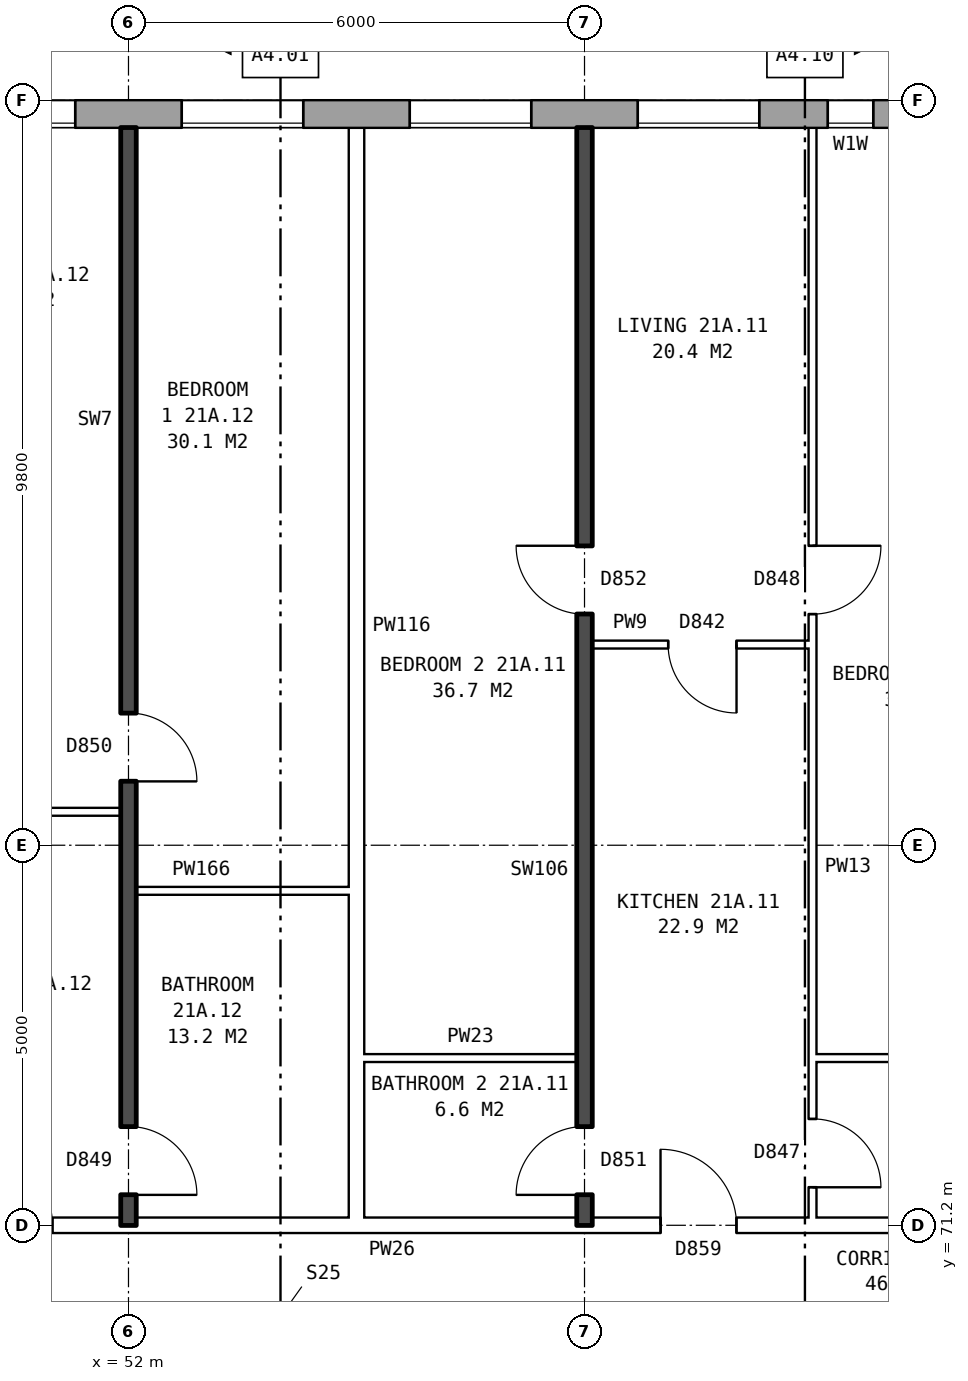
"""IFC4 building model, lengths in metres.
Left out: names, types, materials, properties, quantities, classifications, styles, units other than length and angle.
Written with IfcOpenShell. Run it as: python <this file> out.ifc"""

import sys

from ifc_helpers import new_model, si_unit, direction, frame, frame_2d, origin, place, context, subcontext, project, spatial, rectangle, extrude, element, fill, save


model = new_model("IFC4")
c1 = context("Model", 3, precision=1e-05, world=origin(), true_north=direction((0.0, 1.0)))
c2 = subcontext(c1, "Body", "Model", "MODEL_VIEW")
j1 = project(units=[si_unit("LENGTHUNIT", "METRE"), si_unit("PLANEANGLEUNIT", "RADIAN")], contexts=[c1])
p1 = place(None, origin())
s1 = spatial("IfcSite", under=j1, at=p1, CompositionType="ELEMENT")
p2 = place(p1, origin())
s2 = spatial("IfcBuilding", under=s1, at=p2, CompositionType="ELEMENT")
p3 = place(p2, frame((0.0, 0.0, 77.8)))
s3 = spatial("IfcBuildingStorey", under=s2, at=p3, CompositionType="ELEMENT", Elevation=77.8)
p4 = place(p3, frame((72.925, 85.82, 0.0), z_axis=(0.0, 0.0, 1.0), x_axis=(-1.0, 0.0, 0.0)))
e1 = element("IfcWall", 1, at=p4, inside=s3, PredefinedType="STANDARD", context=c2, shape_type="SweptSolid", body=[
    extrude(rectangle(XDim=46.601, YDim=0.36, at=frame_2d((23.3, 0.0))), origin(), (0.0, 0.0, 1.0), 2.85),
])
p5 = place(p4, frame((0.625, 0.0, 0.8)))
e2 = element("IfcOpeningElement", 2, at=p5, cuts=e1, PredefinedType="OPENING", context=c2, shape_type="SweptSolid", body=[
    extrude(rectangle(XDim=1.6, YDim=1.8, at=frame_2d((0.8, 0.9))), frame((0.0, 0.19, 0.0), z_axis=(0.0, -1.0, 0.0), x_axis=(1.0, 0.0, 0.0)), (0.0, 0.0, 1.0), 0.38),
])
p6 = place(p4, frame((3.625, 0.0, 0.8)))
e3 = element("IfcOpeningElement", 3, at=p6, cuts=e1, PredefinedType="OPENING", context=c2, shape_type="SweptSolid", body=[
    extrude(rectangle(XDim=1.6, YDim=1.8, at=frame_2d((0.8, 0.9))), frame((0.0, 0.19, 0.0), z_axis=(0.0, -1.0, 0.0), x_axis=(1.0, 0.0, 0.0)), (0.0, 0.0, 1.0), 0.38),
])
p7 = place(p4, frame((6.625, 0.0, 0.8)))
e4 = element("IfcOpeningElement", 4, at=p7, cuts=e1, PredefinedType="OPENING", context=c2, shape_type="SweptSolid", body=[
    extrude(rectangle(XDim=1.6, YDim=1.8, at=frame_2d((0.8, 0.9))), frame((0.0, 0.19, 0.0), z_axis=(0.0, -1.0, 0.0), x_axis=(1.0, 0.0, 0.0)), (0.0, 0.0, 1.0), 0.38),
])
p8 = place(p4, frame((9.125, 0.0, 1.65)))
e5 = element("IfcOpeningElement", 5, at=p8, cuts=e1, PredefinedType="OPENING", context=c2, shape_type="SweptSolid", body=[
    extrude(rectangle(XDim=1.4, YDim=0.9, at=frame_2d((0.7, 0.45))), frame((0.0, 0.19, 0.0), z_axis=(0.0, -1.0, 0.0), x_axis=(1.0, 0.0, 0.0)), (0.0, 0.0, 1.0), 0.38),
])
p9 = place(p4, frame((12.625, 0.0, 0.8)))
e6 = element("IfcOpeningElement", 6, at=p9, cuts=e1, PredefinedType="OPENING", context=c2, shape_type="SweptSolid", body=[
    extrude(rectangle(XDim=1.6, YDim=1.8, at=frame_2d((0.8, 0.9))), frame((0.0, 0.19, 0.0), z_axis=(0.0, -1.0, 0.0), x_axis=(1.0, 0.0, 0.0)), (0.0, 0.0, 1.0), 0.38),
])
p10 = place(p4, frame((15.625, 0.0, 0.8)))
e7 = element("IfcOpeningElement", 7, at=p10, cuts=e1, PredefinedType="OPENING", context=c2, shape_type="SweptSolid", body=[
    extrude(rectangle(XDim=1.6, YDim=1.8, at=frame_2d((0.8, 0.9))), frame((0.0, 0.19, 0.0), z_axis=(0.0, -1.0, 0.0), x_axis=(1.0, 0.0, 0.0)), (0.0, 0.0, 1.0), 0.38),
])
p11 = place(p4, frame((18.625, 0.0, 0.8)))
e8 = element("IfcOpeningElement", 8, at=p11, cuts=e1, PredefinedType="OPENING", context=c2, shape_type="SweptSolid", body=[
    extrude(rectangle(XDim=1.6, YDim=1.8, at=frame_2d((0.8, 0.9))), frame((0.0, 0.19, 0.0), z_axis=(0.0, -1.0, 0.0), x_axis=(1.0, 0.0, 0.0)), (0.0, 0.0, 1.0), 0.38),
])
p12 = place(p4, frame((21.625, 0.0, 0.8)))
e9 = element("IfcOpeningElement", 9, at=p12, cuts=e1, PredefinedType="OPENING", context=c2, shape_type="SweptSolid", body=[
    extrude(rectangle(XDim=1.6, YDim=1.8, at=frame_2d((0.8, 0.9))), frame((0.0, 0.19, 0.0), z_axis=(0.0, -1.0, 0.0), x_axis=(1.0, 0.0, 0.0)), (0.0, 0.0, 1.0), 0.38),
])
p13 = place(p4, frame((24.625, 0.0, 0.8)))
e10 = element("IfcOpeningElement", 10, at=p13, cuts=e1, PredefinedType="OPENING", context=c2, shape_type="SweptSolid", body=[
    extrude(rectangle(XDim=1.6, YDim=1.8, at=frame_2d((0.8, 0.9))), frame((0.0, 0.19, 0.0), z_axis=(0.0, -1.0, 0.0), x_axis=(1.0, 0.0, 0.0)), (0.0, 0.0, 1.0), 0.38),
])
p14 = place(p4, frame((27.625, 0.0, 0.8)))
e11 = element("IfcOpeningElement", 11, at=p14, cuts=e1, PredefinedType="OPENING", context=c2, shape_type="SweptSolid", body=[
    extrude(rectangle(XDim=1.6, YDim=1.8, at=frame_2d((0.8, 0.9))), frame((0.0, 0.19, 0.0), z_axis=(0.0, -1.0, 0.0), x_axis=(1.0, 0.0, 0.0)), (0.0, 0.0, 1.0), 0.38),
])
p15 = place(p4, frame((30.625, 0.0, 0.8)))
e12 = element("IfcOpeningElement", 12, at=p15, cuts=e1, PredefinedType="OPENING", context=c2, shape_type="SweptSolid", body=[
    extrude(rectangle(XDim=1.6, YDim=1.8, at=frame_2d((0.8, 0.9))), frame((0.0, 0.19, 0.0), z_axis=(0.0, -1.0, 0.0), x_axis=(1.0, 0.0, 0.0)), (0.0, 0.0, 1.0), 0.38),
])
p16 = place(p4, frame((33.125, 0.0, 0.75)))
e13 = element("IfcOpeningElement", 13, at=p16, cuts=e1, PredefinedType="OPENING", context=c2, shape_type="SweptSolid", body=[
    extrude(rectangle(XDim=0.6, YDim=1.8, at=frame_2d((0.3, 0.9))), frame((0.0, 0.19, 0.0), z_axis=(0.0, -1.0, 0.0), x_axis=(1.0, 0.0, 0.0)), (0.0, 0.0, 1.0), 0.38),
])
p17 = place(p4, frame((36.125, 0.0, 1.6)))
e14 = element("IfcOpeningElement", 14, at=p17, cuts=e1, PredefinedType="OPENING", context=c2, shape_type="SweptSolid", body=[
    extrude(rectangle(XDim=0.6, YDim=0.9, at=frame_2d((0.3, 0.45))), frame((0.0, 0.19, 0.0), z_axis=(0.0, -1.0, 0.0), x_axis=(1.0, 0.0, 0.0)), (0.0, 0.0, 1.0), 0.38),
])
p18 = place(p4, frame((39.625, 0.0, 0.8)))
e15 = element("IfcOpeningElement", 15, at=p18, cuts=e1, PredefinedType="OPENING", context=c2, shape_type="SweptSolid", body=[
    extrude(rectangle(XDim=1.6, YDim=1.8, at=frame_2d((0.8, 0.9))), frame((0.0, 0.19, 0.0), z_axis=(0.0, -1.0, 0.0), x_axis=(1.0, 0.0, 0.0)), (0.0, 0.0, 1.0), 0.38),
])
p19 = place(p4, frame((42.625, 0.0, 0.8)))
e16 = element("IfcOpeningElement", 16, at=p19, cuts=e1, PredefinedType="OPENING", context=c2, shape_type="SweptSolid", body=[
    extrude(rectangle(XDim=1.6, YDim=1.8, at=frame_2d((0.8, 0.9))), frame((0.0, 0.19, 0.0), z_axis=(0.0, -1.0, 0.0), x_axis=(1.0, 0.0, 0.0)), (0.0, 0.0, 1.0), 0.38),
])
p20 = place(p4, frame((11.125, 0.0, 0.15)))
e17 = element("IfcOpeningElement", 17, at=p20, cuts=e1, PredefinedType="OPENING", context=c2, shape_type="SweptSolid", body=[
    extrude(rectangle(XDim=0.6, YDim=0.9, at=frame_2d((0.3, 0.45))), frame((0.0, 0.19, 0.0), z_axis=(0.0, -1.0, 0.0), x_axis=(1.0, 0.0, 0.0)), (0.0, 0.0, 1.0), 0.38),
])
p21 = place(p4, frame((34.025, 0.0, 0.65)))
e18 = element("IfcOpeningElement", 18, at=p21, cuts=e1, PredefinedType="OPENING", context=c2, shape_type="SweptSolid", body=[
    extrude(rectangle(XDim=0.8, YDim=0.9, at=frame_2d((0.4, 0.45))), frame((0.0, 0.19, 0.0), z_axis=(0.0, -1.0, 0.0), x_axis=(1.0, 0.0, 0.0)), (0.0, 0.0, 1.0), 0.38),
])
p22 = place(p4, frame((37.025, 0.0, 0.8)))
e19 = element("IfcOpeningElement", 19, at=p22, cuts=e1, PredefinedType="OPENING", context=c2, shape_type="SweptSolid", body=[
    extrude(rectangle(XDim=1.6, YDim=1.8, at=frame_2d((0.8, 0.9))), frame((0.0, 0.19, 0.0), z_axis=(0.0, -1.0, 0.0), x_axis=(1.0, 0.0, 0.0)), (0.0, 0.0, 1.0), 0.38),
])
p23 = place(p3, frame((44.36, 71.2, 0.0), z_axis=(0.0, 0.0, 1.0), x_axis=(1.0, 0.0, 0.0)))
e20 = element("IfcWall", 20, at=p23, inside=s3, PredefinedType="PARTITIONING", context=c2, shape_type="SweptSolid", body=[
    extrude(rectangle(XDim=19.28, YDim=0.2, at=frame_2d((9.64, 0.0))), origin(), (0.0, 0.0, 1.0), 2.85),
])
p24 = place(p23, frame((14.64, 0.0, 0.0)))
e21 = element("IfcOpeningElement", 21, at=p24, cuts=e20, PredefinedType="OPENING", context=c2, shape_type="SweptSolid", body=[
    extrude(rectangle(XDim=1.0, YDim=2.1, at=frame_2d((0.5, 1.05))), frame((0.0, 0.11, 0.0), z_axis=(0.0, -1.0, 0.0), x_axis=(1.0, 0.0, 0.0)), (0.0, 0.0, 1.0), 0.22),
])
p25 = place(p23, frame((5.64, 0.0, 0.0)))
e22 = element("IfcOpeningElement", 22, at=p25, cuts=e20, PredefinedType="OPENING", context=c2, shape_type="SweptSolid", body=[
    extrude(rectangle(XDim=1.0, YDim=2.1, at=frame_2d((0.5, 1.05))), frame((0.0, 0.11, 0.0), z_axis=(0.0, -1.0, 0.0), x_axis=(1.0, 0.0, 0.0)), (0.0, 0.0, 1.0), 0.22),
])
p26 = place(p3, frame((55.1, 73.4, 0.0), z_axis=(0.0, 0.0, 1.0), x_axis=(1.0, 0.0, 0.0)))
e23 = element("IfcWall", 23, at=p26, inside=s3, PredefinedType="PARTITIONING", context=c2, shape_type="SweptSolid", body=[
    extrude(rectangle(XDim=2.8, YDim=0.1, at=frame_2d((1.4, 0.0))), origin(), (0.0, 0.0, 1.0), 2.85),
])
p27 = place(p3, frame((61.0, 73.4, 0.0), z_axis=(0.0, 0.0, 1.0), x_axis=(1.0, 0.0, 0.0)))
e24 = element("IfcWall", 24, at=p27, inside=s3, PredefinedType="PARTITIONING", context=c2, shape_type="SweptSolid", body=[
    extrude(rectangle(XDim=2.64, YDim=0.1, at=frame_2d((1.32, 0.0))), origin(), (0.0, 0.0, 1.0), 2.85),
])
p28 = place(p3, frame((52.1, 75.6, 0.0), z_axis=(0.0, 0.0, 1.0), x_axis=(1.0, 0.0, 0.0)))
e25 = element("IfcWall", 25, at=p28, inside=s3, PredefinedType="PARTITIONING", context=c2, shape_type="SweptSolid", body=[
    extrude(rectangle(XDim=2.8, YDim=0.1, at=frame_2d((1.4, 0.0))), origin(), (0.0, 0.0, 1.0), 2.85),
])
p29 = place(p3, frame((49.0, 76.64, 0.0), z_axis=(0.0, 0.0, 1.0), x_axis=(1.0, 0.0, 0.0)))
e26 = element("IfcWall", 26, at=p29, inside=s3, PredefinedType="PARTITIONING", context=c2, shape_type="SweptSolid", body=[
    extrude(rectangle(XDim=2.9, YDim=0.1, at=frame_2d((1.45, 0.0))), origin(), (0.0, 0.0, 1.0), 2.85),
])
p30 = place(p29, frame((1.0, 0.0, 0.0)))
e27 = element("IfcOpeningElement", 27, at=p30, cuts=e26, PredefinedType="OPENING", context=c2, shape_type="SweptSolid", body=[
    extrude(rectangle(XDim=0.9, YDim=2.1, at=frame_2d((0.45, 1.05))), frame((0.0, 0.06, 0.0), z_axis=(0.0, -1.0, 0.0), x_axis=(1.0, 0.0, 0.0)), (0.0, 0.0, 1.0), 0.12),
])
p31 = place(p3, frame((58.1, 78.84, 0.0), z_axis=(0.0, 0.0, 1.0), x_axis=(1.0, 0.0, 0.0)))
e28 = element("IfcWall", 28, at=p31, inside=s3, PredefinedType="PARTITIONING", context=c2, shape_type="SweptSolid", body=[
    extrude(rectangle(XDim=2.9, YDim=0.1, at=frame_2d((1.45, 0.0))), origin(), (0.0, 0.0, 1.0), 2.85),
])
p32 = place(p31, frame((1.0, 0.0, 0.0)))
e29 = element("IfcOpeningElement", 29, at=p32, cuts=e28, PredefinedType="OPENING", context=c2, shape_type="SweptSolid", body=[
    extrude(rectangle(XDim=0.9, YDim=2.1, at=frame_2d((0.45, 1.05))), frame((0.0, 0.06, 0.0), z_axis=(0.0, -1.0, 0.0), x_axis=(1.0, 0.0, 0.0)), (0.0, 0.0, 1.0), 0.12),
])
p33 = place(p3, frame((52.0, 71.2, 0.0), z_axis=(0.0, 0.0, 1.0), x_axis=(0.0, 1.0, 0.0)))
e30 = element("IfcWall", 30, at=p33, inside=s3, PredefinedType="SOLIDWALL", context=c2, shape_type="SweptSolid", body=[
    extrude(rectangle(XDim=14.44, YDim=0.2, at=frame_2d((7.22, 0.0))), origin(), (0.0, 0.0, 1.0), 2.85),
])
p34 = place(p33, frame((5.84, 0.0, 0.0)))
e31 = element("IfcOpeningElement", 31, at=p34, cuts=e30, PredefinedType="OPENING", context=c2, shape_type="SweptSolid", body=[
    extrude(rectangle(XDim=0.9, YDim=2.1, at=frame_2d((0.45, 1.05))), frame((0.0, 0.11, 0.0), z_axis=(0.0, -1.0, 0.0), x_axis=(1.0, 0.0, 0.0)), (0.0, 0.0, 1.0), 0.22),
])
p35 = place(p33, frame((0.4, 0.0, 0.0)))
e32 = element("IfcOpeningElement", 32, at=p35, cuts=e30, PredefinedType="OPENING", context=c2, shape_type="SweptSolid", body=[
    extrude(rectangle(XDim=0.9, YDim=2.1, at=frame_2d((0.45, 1.05))), frame((0.0, 0.11, 0.0), z_axis=(0.0, -1.0, 0.0), x_axis=(1.0, 0.0, 0.0)), (0.0, 0.0, 1.0), 0.22),
])
p36 = place(p3, frame((55.0, 71.3, 0.0), z_axis=(0.0, 0.0, 1.0), x_axis=(0.0, 1.0, 0.0)))
e33 = element("IfcWall", 33, at=p36, inside=s3, PredefinedType="PARTITIONING", context=c2, shape_type="SweptSolid", body=[
    extrude(rectangle(XDim=14.34, YDim=0.2, at=frame_2d((7.17, 0.0))), origin(), (0.0, 0.0, 1.0), 2.85),
])
p37 = place(p3, frame((58.0, 71.2, 0.0), z_axis=(0.0, 0.0, 1.0), x_axis=(0.0, 1.0, 0.0)))
e34 = element("IfcWall", 34, at=p37, inside=s3, PredefinedType="SOLIDWALL", context=c2, shape_type="SweptSolid", body=[
    extrude(rectangle(XDim=14.44, YDim=0.2, at=frame_2d((7.22, 0.0))), origin(), (0.0, 0.0, 1.0), 2.85),
])
p38 = place(p37, frame((8.04, 0.0, 0.0)))
e35 = element("IfcOpeningElement", 35, at=p38, cuts=e34, PredefinedType="OPENING", context=c2, shape_type="SweptSolid", body=[
    extrude(rectangle(XDim=0.9, YDim=2.1, at=frame_2d((0.45, 1.05))), frame((0.0, 0.11, 0.0), z_axis=(0.0, -1.0, 0.0), x_axis=(1.0, 0.0, 0.0)), (0.0, 0.0, 1.0), 0.22),
])
p39 = place(p37, frame((0.4, 0.0, 0.0)))
e36 = element("IfcOpeningElement", 36, at=p39, cuts=e34, PredefinedType="OPENING", context=c2, shape_type="SweptSolid", body=[
    extrude(rectangle(XDim=0.9, YDim=2.1, at=frame_2d((0.45, 1.05))), frame((0.0, 0.11, 0.0), z_axis=(0.0, -1.0, 0.0), x_axis=(1.0, 0.0, 0.0)), (0.0, 0.0, 1.0), 0.22),
])
p40 = place(p3, frame((61.0, 71.3, 0.0), z_axis=(0.0, 0.0, 1.0), x_axis=(0.0, 1.0, 0.0)))
e37 = element("IfcWall", 37, at=p40, inside=s3, PredefinedType="PARTITIONING", context=c2, shape_type="SweptSolid", body=[
    extrude(rectangle(XDim=14.34, YDim=0.1, at=frame_2d((7.17, 0.0))), origin(), (0.0, 0.0, 1.0), 2.85),
])
p41 = place(p40, frame((7.94, 0.0, 0.0)))
e38 = element("IfcOpeningElement", 38, at=p41, cuts=e37, PredefinedType="OPENING", context=c2, shape_type="SweptSolid", body=[
    extrude(rectangle(XDim=0.9, YDim=2.1, at=frame_2d((0.45, 1.05))), frame((0.0, 0.06, 0.0), z_axis=(0.0, -1.0, 0.0), x_axis=(1.0, 0.0, 0.0)), (0.0, 0.0, 1.0), 0.12),
])
p42 = place(p40, frame((0.4, 0.0, 0.0)))
e39 = element("IfcOpeningElement", 39, at=p42, cuts=e37, PredefinedType="OPENING", context=c2, shape_type="SweptSolid", body=[
    extrude(rectangle(XDim=0.9, YDim=2.1, at=frame_2d((0.45, 1.05))), frame((0.0, 0.06, 0.0), z_axis=(0.0, -1.0, 0.0), x_axis=(1.0, 0.0, 0.0)), (0.0, 0.0, 1.0), 0.12),
])
p43 = place(p9, origin())
e40 = element("IfcWindow", 40, at=p43, inside=s3, PartitioningType="SINGLE_PANEL", PredefinedType="WINDOW", context=c2, shape_type="SweptSolid", body=[
    extrude(rectangle(XDim=1.6, YDim=1.8, at=frame_2d((0.8, 0.9))), frame((0.0, 0.15, 0.0), z_axis=(0.0, -1.0, 0.0), x_axis=(1.0, 0.0, 0.0)), (0.0, 0.0, 1.0), 0.06),
])
fill(e6, e40)
p44 = place(p10, origin())
e41 = element("IfcWindow", 41, at=p44, inside=s3, PartitioningType="SINGLE_PANEL", PredefinedType="WINDOW", context=c2, shape_type="SweptSolid", body=[
    extrude(rectangle(XDim=1.6, YDim=1.8, at=frame_2d((0.8, 0.9))), frame((0.0, 0.15, 0.0), z_axis=(0.0, -1.0, 0.0), x_axis=(1.0, 0.0, 0.0)), (0.0, 0.0, 1.0), 0.06),
])
fill(e7, e41)
p45 = place(p11, origin())
e42 = element("IfcWindow", 42, at=p45, inside=s3, PartitioningType="SINGLE_PANEL", PredefinedType="WINDOW", context=c2, shape_type="SweptSolid", body=[
    extrude(rectangle(XDim=1.6, YDim=1.8, at=frame_2d((0.8, 0.9))), frame((0.0, 0.15, 0.0), z_axis=(0.0, -1.0, 0.0), x_axis=(1.0, 0.0, 0.0)), (0.0, 0.0, 1.0), 0.06),
])
fill(e8, e42)
p46 = place(p12, origin())
e43 = element("IfcWindow", 43, at=p46, inside=s3, PartitioningType="SINGLE_PANEL", PredefinedType="WINDOW", context=c2, shape_type="SweptSolid", body=[
    extrude(rectangle(XDim=1.6, YDim=1.8, at=frame_2d((0.8, 0.9))), frame((0.0, 0.15, 0.0), z_axis=(0.0, -1.0, 0.0), x_axis=(1.0, 0.0, 0.0)), (0.0, 0.0, 1.0), 0.06),
])
fill(e9, e43)
p47 = place(p41, frame((0.9, 0.0, 0.0), z_axis=(0.0, 0.0, 1.0), x_axis=(-1.0, 0.0, 0.0)))
e44 = element("IfcDoor", 44, at=p47, inside=s3, OperationType="SINGLE_SWING_LEFT", PredefinedType="DOOR", context=c2, shape_type="SweptSolid", body=[
    extrude(rectangle(XDim=0.9, YDim=2.1, at=frame_2d((0.45, 1.05))), frame((0.0, 0.025, 0.0), z_axis=(0.0, -1.0, 0.0), x_axis=(1.0, 0.0, 0.0)), (0.0, 0.0, 1.0), 0.05),
])
fill(e38, e44)
p48 = place(p38, origin())
e45 = element("IfcDoor", 45, at=p48, inside=s3, OperationType="SINGLE_SWING_RIGHT", PredefinedType="DOOR", context=c2, shape_type="SweptSolid", body=[
    extrude(rectangle(XDim=0.9, YDim=2.1, at=frame_2d((0.45, 1.05))), frame((0.0, 0.025, 0.0), z_axis=(0.0, -1.0, 0.0), x_axis=(1.0, 0.0, 0.0)), (0.0, 0.0, 1.0), 0.05),
])
fill(e35, e45)
p49 = place(p24, origin())
e46 = element("IfcDoor", 46, at=p49, inside=s3, OperationType="SINGLE_SWING_LEFT", PredefinedType="DOOR", context=c2, shape_type="SweptSolid", body=[
    extrude(rectangle(XDim=1.0, YDim=2.1, at=frame_2d((0.5, 1.05))), frame((0.0, 0.025, 0.0), z_axis=(0.0, -1.0, 0.0), x_axis=(1.0, 0.0, 0.0)), (0.0, 0.0, 1.0), 0.05),
])
fill(e21, e46)
p50 = place(p32, frame((0.9, 0.0, 0.0), z_axis=(0.0, 0.0, 1.0), x_axis=(-1.0, 0.0, 0.0)))
e47 = element("IfcDoor", 47, at=p50, inside=s3, OperationType="SINGLE_SWING_LEFT", PredefinedType="DOOR", context=c2, shape_type="SweptSolid", body=[
    extrude(rectangle(XDim=0.9, YDim=2.1, at=frame_2d((0.45, 1.05))), frame((0.0, 0.025, 0.0), z_axis=(0.0, -1.0, 0.0), x_axis=(1.0, 0.0, 0.0)), (0.0, 0.0, 1.0), 0.05),
])
fill(e29, e47)
p51 = place(p42, frame((0.9, 0.0, 0.0), z_axis=(0.0, 0.0, 1.0), x_axis=(-1.0, 0.0, 0.0)))
e48 = element("IfcDoor", 48, at=p51, inside=s3, OperationType="SINGLE_SWING_RIGHT", PredefinedType="DOOR", context=c2, shape_type="SweptSolid", body=[
    extrude(rectangle(XDim=0.9, YDim=2.1, at=frame_2d((0.45, 1.05))), frame((0.0, 0.025, 0.0), z_axis=(0.0, -1.0, 0.0), x_axis=(1.0, 0.0, 0.0)), (0.0, 0.0, 1.0), 0.05),
])
fill(e39, e48)
p52 = place(p39, origin())
e49 = element("IfcDoor", 49, at=p52, inside=s3, OperationType="SINGLE_SWING_LEFT", PredefinedType="DOOR", context=c2, shape_type="SweptSolid", body=[
    extrude(rectangle(XDim=0.9, YDim=2.1, at=frame_2d((0.45, 1.05))), frame((0.0, 0.025, 0.0), z_axis=(0.0, -1.0, 0.0), x_axis=(1.0, 0.0, 0.0)), (0.0, 0.0, 1.0), 0.05),
])
fill(e36, e49)
p53 = place(p34, frame((0.9, 0.0, 0.0), z_axis=(0.0, 0.0, 1.0), x_axis=(-1.0, 0.0, 0.0)))
e50 = element("IfcDoor", 50, at=p53, inside=s3, OperationType="SINGLE_SWING_RIGHT", PredefinedType="DOOR", context=c2, shape_type="SweptSolid", body=[
    extrude(rectangle(XDim=0.9, YDim=2.1, at=frame_2d((0.45, 1.05))), frame((0.0, 0.025, 0.0), z_axis=(0.0, -1.0, 0.0), x_axis=(1.0, 0.0, 0.0)), (0.0, 0.0, 1.0), 0.05),
])
fill(e31, e50)
p54 = place(p35, frame((0.9, 0.0, 0.0), z_axis=(0.0, 0.0, 1.0), x_axis=(-1.0, 0.0, 0.0)))
e51 = element("IfcDoor", 51, at=p54, inside=s3, OperationType="SINGLE_SWING_RIGHT", PredefinedType="DOOR", context=c2, shape_type="SweptSolid", body=[
    extrude(rectangle(XDim=0.9, YDim=2.1, at=frame_2d((0.45, 1.05))), frame((0.0, 0.025, 0.0), z_axis=(0.0, -1.0, 0.0), x_axis=(1.0, 0.0, 0.0)), (0.0, 0.0, 1.0), 0.05),
])
fill(e32, e51)
p55 = place(p20, origin())
e52 = element("IfcWindow", 52, at=p55, inside=s3, PartitioningType="SINGLE_PANEL", PredefinedType="WINDOW", context=c2, shape_type="SweptSolid", body=[
    extrude(rectangle(XDim=0.6, YDim=0.9, at=frame_2d((0.3, 0.45))), frame((0.0, 0.15, 0.0), z_axis=(0.0, -1.0, 0.0), x_axis=(1.0, 0.0, 0.0)), (0.0, 0.0, 1.0), 0.06),
])
fill(e17, e52)
save(model, sys.argv[1])
